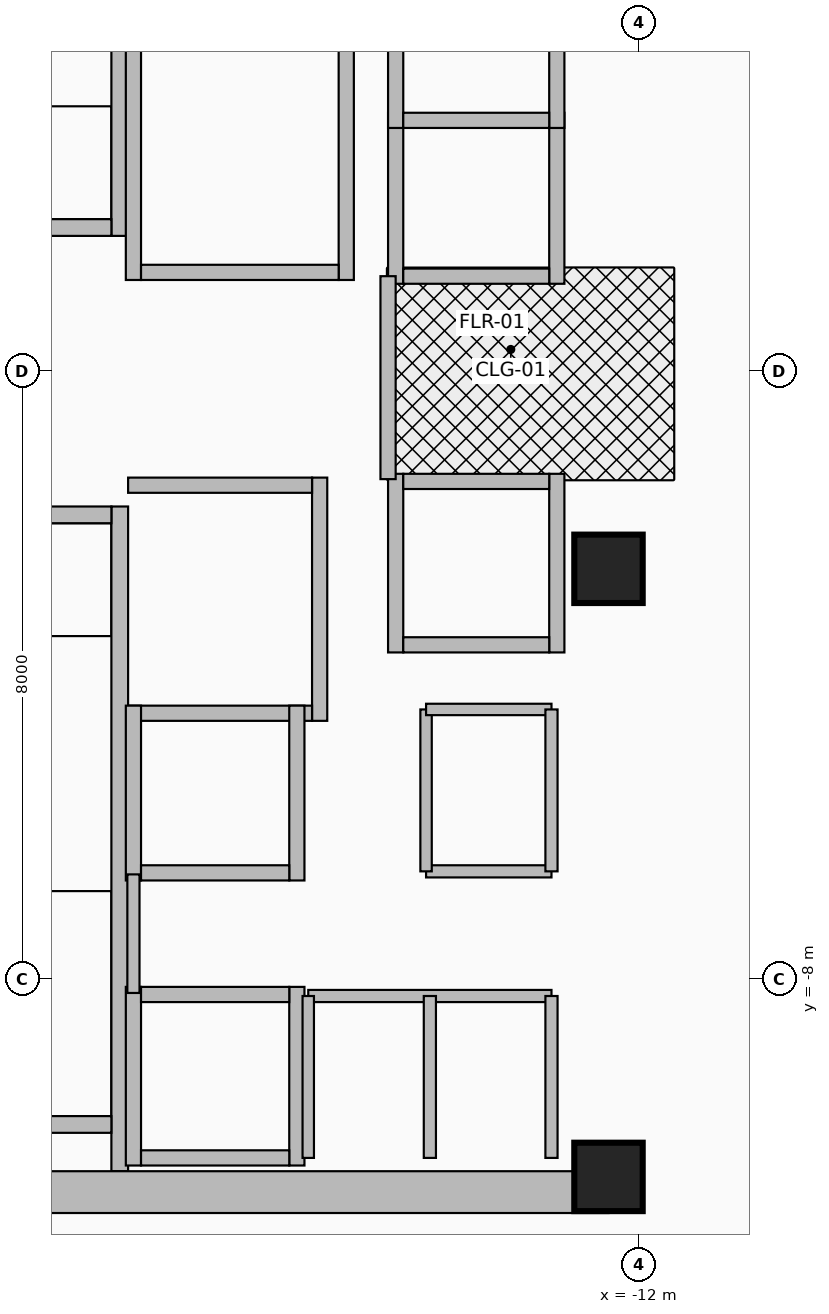
"""IFC4 building model, lengths in metres.
Left out: names, types, materials, properties, quantities, classifications, styles, units other than length and angle.
Written with IfcOpenShell. Run it as: python <this file> out.ifc"""

import sys

from ifc_helpers import new_model, si_unit, direction, frame, frame_2d, origin, origin_2d, place, context, subcontext, project, spatial, rectangle, extrude, source, transform, mapped, element, fill, save


model = new_model("IFC4")
c1 = context("Model", 3, precision=1e-05, world=origin(), true_north=direction((0.0, 1.0)))
c2 = subcontext(c1, "Body", "Model", "MODEL_VIEW")
j1 = project(units=[si_unit("LENGTHUNIT", "METRE"), si_unit("PLANEANGLEUNIT", "RADIAN")], contexts=[c1])
p1 = place(None, origin())
s1 = spatial("IfcSite", under=j1, at=p1, CompositionType="ELEMENT")
p2 = place(p1, origin())
s2 = spatial("IfcBuilding", under=s1, at=p2, CompositionType="ELEMENT")
p3 = place(p2, frame((0.0, 0.0, 201.0)))
s3 = spatial("IfcBuildingStorey", under=s2, at=p3, CompositionType="ELEMENT", Elevation=201.0)
p4 = place(p3, frame((-18.83, 1.78, 0.0), z_axis=(0.0, 0.0, 1.0), x_axis=(0.0, 1.0, 0.0)))
e1 = element("IfcWall", 1, at=p4, inside=s3, PredefinedType="SHEAR", context=c2, shape_type="SweptSolid", body=[
    extrude(rectangle(XDim=8.745, YDim=0.22, at=frame_2d((4.373, 0.0))), origin(), (0.0, 0.0, 1.0), 4.26),
])
p5 = place(p3, frame((-22.05, 1.89, 0.0), z_axis=(0.0, 0.0, 1.0), x_axis=(1.0, 0.0, 0.0)))
e2 = element("IfcWall", 2, at=p5, inside=s3, PredefinedType="SHEAR", context=c2, shape_type="SweptSolid", body=[
    extrude(rectangle(XDim=3.11, YDim=0.22, at=frame_2d((1.555, 0.0))), origin(), (0.0, 0.0, 1.0), 4.26),
])
p6 = place(p5, frame((1.0, 0.0, 0.0)))
e3 = element("IfcOpeningElement", 3, at=p6, cuts=e2, PredefinedType="OPENING", context=c2, shape_type="SweptSolid", body=[
    extrude(rectangle(XDim=1.1, YDim=2.15, at=frame_2d((0.55, 1.075))), frame((0.0, 0.125, 0.0), z_axis=(0.0, -1.0, 0.0), x_axis=(1.0, 0.0, 0.0)), (0.0, 0.0, 1.0), 0.25),
])
p7 = place(p3, frame((-18.83, -10.525, 0.0), z_axis=(0.0, 0.0, 1.0), x_axis=(0.0, 1.0, 0.0)))
e4 = element("IfcWall", 4, at=p7, inside=s3, PredefinedType="SHEAR", context=c2, shape_type="SweptSolid", body=[
    extrude(rectangle(XDim=8.745, YDim=0.22, at=frame_2d((4.373, 0.0))), origin(), (0.0, 0.0, 1.0), 4.26),
])
p8 = place(p3, frame((-22.05, -9.91, 0.0), z_axis=(0.0, 0.0, 1.0), x_axis=(1.0, 0.0, 0.0)))
e5 = element("IfcWall", 5, at=p8, inside=s3, PredefinedType="SHEAR", context=c2, shape_type="SweptSolid", body=[
    extrude(rectangle(XDim=3.11, YDim=0.22, at=frame_2d((1.555, 0.0))), origin(), (0.0, 0.0, 1.0), 4.26),
])
p9 = place(p3, frame((-22.05, -1.89, 0.0), z_axis=(0.0, 0.0, 1.0), x_axis=(1.0, 0.0, 0.0)))
e6 = element("IfcWall", 6, at=p9, inside=s3, PredefinedType="SHEAR", context=c2, shape_type="SweptSolid", body=[
    extrude(rectangle(XDim=3.11, YDim=0.22, at=frame_2d((1.555, 0.0))), origin(), (0.0, 0.0, 1.0), 4.26),
])
p10 = place(p9, frame((1.0, 0.0, 0.0)))
e7 = element("IfcOpeningElement", 7, at=p10, cuts=e6, PredefinedType="OPENING", context=c2, shape_type="SweptSolid", body=[
    extrude(rectangle(XDim=1.1, YDim=2.15, at=frame_2d((0.55, 1.075))), frame((0.0, 0.125, 0.0), z_axis=(0.0, -1.0, 0.0), x_axis=(1.0, 0.0, 0.0)), (0.0, 0.0, 1.0), 0.25),
])
p11 = place(p3, frame((-22.65, -10.8, 0.0), z_axis=(0.0, 0.0, 1.0), x_axis=(1.0, 0.0, 0.0)))
e8 = element("IfcWall", 8, at=p11, inside=s3, PredefinedType="SHEAR", context=c2, shape_type="SweptSolid", body=[
    extrude(rectangle(XDim=10.25, YDim=0.55, at=frame_2d((5.125, 0.0))), origin(), (0.0, 0.0, 1.0), 4.26),
])
m1 = source(origin(), c2, "Body", "SweptSolid", [
    extrude(rectangle(XDim=0.9, YDim=0.9, at=origin_2d()), origin(), (0.0, 0.0, 1.0), 4.5),
])
for number, where, z_axis, x_axis in (
    (9, (-12.4, -10.6, 0.0), (0.0, 0.0, 1.0), (1.0, 0.0, 0.0)),
    (10, (-12.4, -2.6, 0.0), (0.0, 0.0, 1.0), (1.0, 0.0, 0.0)),
):
    element("IfcColumn", number, at=place(p3, frame(where, z_axis=z_axis, x_axis=x_axis)), inside=s3, PredefinedType="COLUMN", context=c2, shape_type="MappedRepresentation", body=[
        mapped(m1, transform((0.0, 0.0, 0.0), x_axis=(1.0, 0.0, 0.0), y_axis=(0.0, 1.0, 0.0), z_axis=(0.0, 0.0, 1.0), scale=1.0)),
    ])
for number, where, z_axis, x_axis in (
    (11, (-18.65, 1.2, 0.0), (0.0, 0.0, 1.0), (0.0, 1.0, 0.0)),
    (12, (-15.85, 1.2, 0.0), (0.0, 0.0, 1.0), (0.0, 1.0, 0.0)),
):
    element("IfcWall", number, at=place(p3, frame(where, z_axis=z_axis, x_axis=x_axis)), inside=s3, PredefinedType="MOVABLE", context=c2, shape_type="SweptSolid", body=[
        extrude(rectangle(XDim=3.225, YDim=0.2, at=frame_2d((1.613, 0.0))), origin(), (0.0, 0.0, 1.0), 4.26),
    ])
p12 = place(p3, frame((-18.55, 1.3, 0.0), z_axis=(0.0, 0.0, 1.0), x_axis=(1.0, 0.0, 0.0)))
e13 = element("IfcWall", 13, at=p12, inside=s3, PredefinedType="MOVABLE", context=c2, shape_type="SweptSolid", body=[
    extrude(rectangle(XDim=2.6, YDim=0.2, at=frame_2d((1.3, 0.0))), origin(), (0.0, 0.0, 1.0), 4.26),
])
p13 = place(p12, frame((0.7, 0.0, 0.0)))
e14 = element("IfcOpeningElement", 14, at=p13, cuts=e13, PredefinedType="OPENING", context=c2, shape_type="SweptSolid", body=[
    extrude(rectangle(XDim=1.2, YDim=2.1, at=frame_2d((0.6, 1.05))), frame((0.0, 0.115, 0.0), z_axis=(0.0, -1.0, 0.0), x_axis=(1.0, 0.0, 0.0)), (0.0, 0.0, 1.0), 0.23),
])
p14 = place(p3, frame((-16.2, -4.6, 0.0), z_axis=(0.0, 0.0, 1.0), x_axis=(0.0, 1.0, 0.0)))
e15 = element("IfcWall", 15, at=p14, inside=s3, PredefinedType="MOVABLE", context=c2, shape_type="SweptSolid", body=[
    extrude(rectangle(XDim=3.2, YDim=0.2, at=frame_2d((1.6, 0.0))), origin(), (0.0, 0.0, 1.0), 4.26),
])
p15 = place(p3, frame((-18.72, -4.5, 0.0), z_axis=(0.0, 0.0, 1.0), x_axis=(1.0, 0.0, 0.0)))
e16 = element("IfcWall", 16, at=p15, inside=s3, PredefinedType="MOVABLE", context=c2, shape_type="SweptSolid", body=[
    extrude(rectangle(XDim=2.42, YDim=0.2, at=frame_2d((1.21, 0.0))), origin(), (0.0, 0.0, 1.0), 4.26),
])
p16 = place(p3, frame((-18.72, -1.5, 0.0), z_axis=(0.0, 0.0, 1.0), x_axis=(1.0, 0.0, 0.0)))
e17 = element("IfcWall", 17, at=p16, inside=s3, PredefinedType="MOVABLE", context=c2, shape_type="SweptSolid", body=[
    extrude(rectangle(XDim=2.42, YDim=0.2, at=frame_2d((1.21, 0.0))), origin(), (0.0, 0.0, 1.0), 4.26),
])
p17 = place(p16, frame((0.61, 0.0, 0.0)))
e18 = element("IfcOpeningElement", 18, at=p17, cuts=e17, PredefinedType="OPENING", context=c2, shape_type="SweptSolid", body=[
    extrude(rectangle(XDim=1.2, YDim=2.1, at=frame_2d((0.6, 1.05))), frame((0.0, 0.115, 0.0), z_axis=(0.0, -1.0, 0.0), x_axis=(1.0, 0.0, 0.0)), (0.0, 0.0, 1.0), 0.23),
])
for number, where, z_axis, x_axis in (
    (19, (-18.65, -10.45, 0.0), (0.0, 0.0, 1.0), (0.0, 1.0, 0.0)),
    (20, (-16.5, -10.45, 0.0), (0.0, 0.0, 1.0), (0.0, 1.0, 0.0)),
):
    element("IfcWall", number, at=place(p3, frame(where, z_axis=z_axis, x_axis=x_axis)), inside=s3, PredefinedType="MOVABLE", context=c2, shape_type="SweptSolid", body=[
        extrude(rectangle(XDim=2.35, YDim=0.2, at=frame_2d((1.175, 0.0))), origin(), (0.0, 0.0, 1.0), 3.544),
    ])
p18 = place(p3, frame((-18.55, -10.35, 0.0), z_axis=(0.0, 0.0, 1.0), x_axis=(1.0, 0.0, 0.0)))
e21 = element("IfcWall", 21, at=p18, inside=s3, PredefinedType="MOVABLE", context=c2, shape_type="SweptSolid", body=[
    extrude(rectangle(XDim=1.95, YDim=0.2, at=frame_2d((0.975, 0.0))), origin(), (0.0, 0.0, 1.0), 3.544),
])
p19 = place(p3, frame((-18.55, -8.2, 0.0), z_axis=(0.0, 0.0, 1.0), x_axis=(1.0, 0.0, 0.0)))
e22 = element("IfcWall", 22, at=p19, inside=s3, PredefinedType="MOVABLE", context=c2, shape_type="SweptSolid", body=[
    extrude(rectangle(XDim=1.95, YDim=0.2, at=frame_2d((0.975, 0.0))), origin(), (0.0, 0.0, 1.0), 4.26),
])
p20 = place(p19, frame((0.425, 0.0, 0.0)))
e23 = element("IfcOpeningElement", 23, at=p20, cuts=e22, PredefinedType="OPENING", context=c2, shape_type="SweptSolid", body=[
    extrude(rectangle(XDim=1.1, YDim=2.1, at=frame_2d((0.55, 1.05))), frame((0.0, 0.115, 0.0), z_axis=(0.0, -1.0, 0.0), x_axis=(1.0, 0.0, 0.0)), (0.0, 0.0, 1.0), 0.23),
])
p21 = place(p3, frame((-15.2, 1.15, 0.0), z_axis=(0.0, 0.0, 1.0), x_axis=(0.0, 1.0, 0.0)))
e24 = element("IfcWall", 24, at=p21, inside=s3, PredefinedType="MOVABLE", context=c2, shape_type="SweptSolid", body=[
    extrude(rectangle(XDim=2.25, YDim=0.2, at=frame_2d((1.125, 0.0))), origin(), (0.0, 0.0, 1.0), 4.26),
])
p22 = place(p3, frame((-13.08, 1.15, 0.0), z_axis=(0.0, 0.0, 1.0), x_axis=(0.0, 1.0, 0.0)))
e25 = element("IfcWall", 25, at=p22, inside=s3, PredefinedType="MOVABLE", context=c2, shape_type="SweptSolid", body=[
    extrude(rectangle(XDim=2.25, YDim=0.2, at=frame_2d((1.125, 0.0))), origin(), (0.0, 0.0, 1.0), 4.26),
])
p23 = place(p22, frame((0.575, 0.0, 0.0)))
e26 = element("IfcOpeningElement", 26, at=p23, cuts=e25, PredefinedType="OPENING", context=c2, shape_type="SweptSolid", body=[
    extrude(rectangle(XDim=1.1, YDim=2.1, at=frame_2d((0.55, 1.05))), frame((0.0, 0.115, 0.0), z_axis=(0.0, -1.0, 0.0), x_axis=(1.0, 0.0, 0.0)), (0.0, 0.0, 1.0), 0.23),
])
p24 = place(p3, frame((-15.1, 1.25, 0.0), z_axis=(0.0, 0.0, 1.0), x_axis=(1.0, 0.0, 0.0)))
e27 = element("IfcWall", 27, at=p24, inside=s3, PredefinedType="MOVABLE", context=c2, shape_type="SweptSolid", body=[
    extrude(rectangle(XDim=1.92, YDim=0.2, at=frame_2d((0.96, 0.0))), origin(), (0.0, 0.0, 1.0), 4.26),
])
p25 = place(p3, frame((-15.2, 3.2, 0.0), z_axis=(0.0, 0.0, 1.0), x_axis=(0.0, 1.0, 0.0)))
e28 = element("IfcWall", 28, at=p25, inside=s3, PredefinedType="MOVABLE", context=c2, shape_type="SweptSolid", body=[
    extrude(rectangle(XDim=2.25, YDim=0.2, at=frame_2d((1.125, 0.0))), origin(), (0.0, 0.0, 1.0), 4.26),
])
p26 = place(p3, frame((-13.08, 3.2, 0.0), z_axis=(0.0, 0.0, 1.0), x_axis=(0.0, 1.0, 0.0)))
e29 = element("IfcWall", 29, at=p26, inside=s3, PredefinedType="MOVABLE", context=c2, shape_type="SweptSolid", body=[
    extrude(rectangle(XDim=2.25, YDim=0.2, at=frame_2d((1.125, 0.0))), origin(), (0.0, 0.0, 1.0), 4.26),
])
p27 = place(p26, frame((0.575, 0.0, 0.0)))
e30 = element("IfcOpeningElement", 30, at=p27, cuts=e29, PredefinedType="OPENING", context=c2, shape_type="SweptSolid", body=[
    extrude(rectangle(XDim=1.1, YDim=2.1, at=frame_2d((0.55, 1.05))), frame((0.0, 0.115, 0.0), z_axis=(0.0, -1.0, 0.0), x_axis=(1.0, 0.0, 0.0)), (0.0, 0.0, 1.0), 0.23),
])
p28 = place(p3, frame((-15.1, 3.3, 0.0), z_axis=(0.0, 0.0, 1.0), x_axis=(1.0, 0.0, 0.0)))
e31 = element("IfcWall", 31, at=p28, inside=s3, PredefinedType="MOVABLE", context=c2, shape_type="SweptSolid", body=[
    extrude(rectangle(XDim=1.92, YDim=0.2, at=frame_2d((0.96, 0.0))), origin(), (0.0, 0.0, 1.0), 4.26),
])
for number, where, z_axis, x_axis in (
    (32, (-18.65, -6.7, 0.0), (0.0, 0.0, 1.0), (0.0, 1.0, 0.0)),
    (33, (-16.5, -6.7, 0.0), (0.0, 0.0, 1.0), (0.0, 1.0, 0.0)),
):
    element("IfcWall", number, at=place(p3, frame(where, z_axis=z_axis, x_axis=x_axis)), inside=s3, PredefinedType="MOVABLE", context=c2, shape_type="SweptSolid", body=[
        extrude(rectangle(XDim=2.3, YDim=0.2, at=frame_2d((1.15, 0.0))), origin(), (0.0, 0.0, 1.0), 4.26),
    ])
p29 = place(p3, frame((-18.55, -6.6, 0.0), z_axis=(0.0, 0.0, 1.0), x_axis=(1.0, 0.0, 0.0)))
e34 = element("IfcWall", 34, at=p29, inside=s3, PredefinedType="MOVABLE", context=c2, shape_type="SweptSolid", body=[
    extrude(rectangle(XDim=1.95, YDim=0.2, at=frame_2d((0.975, 0.0))), origin(), (0.0, 0.0, 1.0), 4.26),
])
p30 = place(p29, frame((0.425, 0.0, 0.0)))
e35 = element("IfcOpeningElement", 35, at=p30, cuts=e34, PredefinedType="OPENING", context=c2, shape_type="SweptSolid", body=[
    extrude(rectangle(XDim=1.1, YDim=2.1, at=frame_2d((0.55, 1.05))), frame((0.0, 0.115, 0.0), z_axis=(0.0, -1.0, 0.0), x_axis=(1.0, 0.0, 0.0)), (0.0, 0.0, 1.0), 0.23),
])
for number, where, z_axis, x_axis in (
    (36, (-15.2, -3.7, 0.0), (0.0, 0.0, 1.0), (0.0, 1.0, 0.0)),
    (37, (-13.08, -3.7, 0.0), (0.0, 0.0, 1.0), (0.0, 1.0, 0.0)),
):
    element("IfcWall", number, at=place(p3, frame(where, z_axis=z_axis, x_axis=x_axis)), inside=s3, PredefinedType="MOVABLE", context=c2, shape_type="SweptSolid", body=[
        extrude(rectangle(XDim=2.35, YDim=0.2, at=frame_2d((1.175, 0.0))), origin(), (0.0, 0.0, 1.0), 4.26),
    ])
p31 = place(p3, frame((-15.1, -3.6, 0.0), z_axis=(0.0, 0.0, 1.0), x_axis=(1.0, 0.0, 0.0)))
e38 = element("IfcWall", 38, at=p31, inside=s3, PredefinedType="MOVABLE", context=c2, shape_type="SweptSolid", body=[
    extrude(rectangle(XDim=1.92, YDim=0.2, at=frame_2d((0.96, 0.0))), origin(), (0.0, 0.0, 1.0), 4.26),
])
p32 = place(p3, frame((-15.1, -1.45, 0.0), z_axis=(0.0, 0.0, 1.0), x_axis=(1.0, 0.0, 0.0)))
e39 = element("IfcWall", 39, at=p32, inside=s3, PredefinedType="MOVABLE", context=c2, shape_type="SweptSolid", body=[
    extrude(rectangle(XDim=1.92, YDim=0.2, at=frame_2d((0.96, 0.0))), origin(), (0.0, 0.0, 1.0), 4.26),
])
p33 = place(p32, frame((0.41, 0.0, 0.0)))
e40 = element("IfcOpeningElement", 40, at=p33, cuts=e39, PredefinedType="OPENING", context=c2, shape_type="SweptSolid", body=[
    extrude(rectangle(XDim=1.1, YDim=2.1, at=frame_2d((0.55, 1.05))), frame((0.0, 0.115, 0.0), z_axis=(0.0, -1.0, 0.0), x_axis=(1.0, 0.0, 0.0)), (0.0, 0.0, 1.0), 0.23),
])
p34 = place(p3, frame((-15.3, -1.42, 0.0), z_axis=(0.0, 0.0, 1.0), x_axis=(0.0, 1.0, 0.0)))
e41 = element("IfcWall", 41, at=p34, inside=s3, PredefinedType="PARTITIONING", context=c2, shape_type="SweptSolid", body=[
    extrude(rectangle(XDim=2.67, YDim=0.2, at=frame_2d((1.335, 0.0))), origin(), (0.0, 0.0, 1.0), 4.26),
])
p35 = place(p34, frame((0.78, 0.0, 0.0)))
e42 = element("IfcOpeningElement", 42, at=p35, cuts=e41, PredefinedType="OPENING", context=c2, shape_type="SweptSolid", body=[
    extrude(rectangle(XDim=1.05, YDim=2.15, at=frame_2d((0.525, 1.075))), frame((0.0, 0.115, 0.0), z_axis=(0.0, -1.0, 0.0), x_axis=(1.0, 0.0, 0.0)), (0.0, 0.0, 1.0), 0.23),
])
p36 = place(p3, frame((-18.65, -8.18, 0.0), z_axis=(0.0, 0.0, 1.0), x_axis=(0.0, 1.0, 0.0)))
e43 = element("IfcWall", 43, at=p36, inside=s3, PredefinedType="PARTITIONING", context=c2, shape_type="SweptSolid", body=[
    extrude(rectangle(XDim=1.56, YDim=0.16, at=frame_2d((0.78, 0.0))), origin(), (0.0, 0.0, 1.0), 4.26),
])
p37 = place(p3, frame((-16.35, -8.22, 0.0), z_axis=(0.0, 0.0, 1.0), x_axis=(1.0, 0.0, 0.0)))
e44 = element("IfcWall", 44, at=p37, inside=s3, PredefinedType="PARTITIONING", context=c2, shape_type="SweptSolid", body=[
    extrude(rectangle(XDim=3.2, YDim=0.16, at=frame_2d((1.6, 0.0))), origin(), (0.0, 0.0, 1.0), 4.26),
])
p38 = place(p37, frame((0.35, 0.0, 0.0)))
e45 = element("IfcOpeningElement", 45, at=p38, cuts=e44, PredefinedType="OPENING", context=c2, shape_type="SweptSolid", body=[
    extrude(rectangle(XDim=0.85, YDim=2.05, at=frame_2d((0.425, 1.025))), frame((0.0, 0.095, 0.0), z_axis=(0.0, -1.0, 0.0), x_axis=(1.0, 0.0, 0.0)), (0.0, 0.0, 1.0), 0.19),
])
p39 = place(p37, frame((1.95, 0.0, 0.0)))
e46 = element("IfcOpeningElement", 46, at=p39, cuts=e44, PredefinedType="OPENING", context=c2, shape_type="SweptSolid", body=[
    extrude(rectangle(XDim=0.85, YDim=2.05, at=frame_2d((0.425, 1.025))), frame((0.0, 0.095, 0.0), z_axis=(0.0, -1.0, 0.0), x_axis=(1.0, 0.0, 0.0)), (0.0, 0.0, 1.0), 0.19),
])
p40 = place(p3, frame((-16.35, -10.35, 0.0), z_axis=(0.0, 0.0, 1.0), x_axis=(0.0, 1.0, 0.0)))
e47 = element("IfcWall", 47, at=p40, inside=s3, PredefinedType="PARTITIONING", context=c2, shape_type="SweptSolid", body=[
    extrude(rectangle(XDim=2.13, YDim=0.15, at=frame_2d((1.065, 0.0))), origin(), (0.0, 0.0, 1.0), 4.26),
])
for number, where, z_axis, x_axis in (
    (48, (-13.15, -10.35, 0.0), (0.0, 0.0, 1.0), (0.0, 1.0, 0.0)),
    (49, (-14.75, -10.35, 0.0), (0.0, 0.0, 1.0), (0.0, 1.0, 0.0)),
):
    element("IfcWall", number, at=place(p3, frame(where, z_axis=z_axis, x_axis=x_axis)), inside=s3, PredefinedType="PARTITIONING", context=c2, shape_type="SweptSolid", body=[
        extrude(rectangle(XDim=2.13, YDim=0.16, at=frame_2d((1.065, 0.0))), origin(), (0.0, 0.0, 1.0), 4.26),
    ])
p41 = place(p3, frame((-14.8, -6.58, 0.0), z_axis=(0.0, 0.0, 1.0), x_axis=(1.0, 0.0, 0.0)))
e50 = element("IfcWall", 50, at=p41, inside=s3, PredefinedType="PARTITIONING", context=c2, shape_type="SweptSolid", body=[
    extrude(rectangle(XDim=1.65, YDim=0.16, at=frame_2d((0.825, 0.0))), origin(), (0.0, 0.0, 1.0), 4.26),
])
p42 = place(p41, frame((0.5, 0.0, 0.0)))
e51 = element("IfcOpeningElement", 51, at=p42, cuts=e50, PredefinedType="OPENING", context=c2, shape_type="SweptSolid", body=[
    extrude(rectangle(XDim=0.85, YDim=2.05, at=frame_2d((0.425, 1.025))), frame((0.0, 0.095, 0.0), z_axis=(0.0, -1.0, 0.0), x_axis=(1.0, 0.0, 0.0)), (0.0, 0.0, 1.0), 0.19),
])
p43 = place(p3, frame((-14.8, -6.58, 0.0), z_axis=(0.0, 0.0, 1.0), x_axis=(0.0, 1.0, 0.0)))
e52 = element("IfcWall", 52, at=p43, inside=s3, PredefinedType="PARTITIONING", context=c2, shape_type="SweptSolid", body=[
    extrude(rectangle(XDim=2.13, YDim=0.15, at=frame_2d((1.065, 0.0))), origin(), (0.0, 0.0, 1.0), 4.26),
])
p44 = place(p3, frame((-14.8, -4.45, 0.0), z_axis=(0.0, 0.0, 1.0), x_axis=(1.0, 0.0, 0.0)))
e53 = element("IfcWall", 53, at=p44, inside=s3, PredefinedType="PARTITIONING", context=c2, shape_type="SweptSolid", body=[
    extrude(rectangle(XDim=1.65, YDim=0.15, at=frame_2d((0.825, 0.0))), origin(), (0.0, 0.0, 1.0), 4.26),
])
p45 = place(p3, frame((-13.15, -6.58, 0.0), z_axis=(0.0, 0.0, 1.0), x_axis=(0.0, 1.0, 0.0)))
e54 = element("IfcWall", 54, at=p45, inside=s3, PredefinedType="PARTITIONING", context=c2, shape_type="SweptSolid", body=[
    extrude(rectangle(XDim=2.13, YDim=0.16, at=frame_2d((1.065, 0.0))), origin(), (0.0, 0.0, 1.0), 4.26),
])
p46 = place(p13, origin())
e55 = element("IfcDoor", 55, at=p46, inside=s3, OperationType="DOUBLE_DOOR_SLIDING", PredefinedType="DOOR", context=c2, shape_type="SweptSolid", body=[
    extrude(rectangle(XDim=1.2, YDim=2.1, at=frame_2d((0.6, 1.05))), frame((0.0, 0.025, 0.0), z_axis=(0.0, -1.0, 0.0), x_axis=(1.0, 0.0, 0.0)), (0.0, 0.0, 1.0), 0.05),
])
fill(e14, e55)
p47 = place(p17, origin())
e56 = element("IfcDoor", 56, at=p47, inside=s3, OperationType="DOUBLE_DOOR_SLIDING", PredefinedType="DOOR", context=c2, shape_type="SweptSolid", body=[
    extrude(rectangle(XDim=1.2, YDim=2.1, at=frame_2d((0.6, 1.05))), frame((0.0, 0.025, 0.0), z_axis=(0.0, -1.0, 0.0), x_axis=(1.0, 0.0, 0.0)), (0.0, 0.0, 1.0), 0.05),
])
fill(e18, e56)
p48 = place(p20, origin())
e57 = element("IfcDoor", 57, at=p48, inside=s3, OperationType="DOUBLE_DOOR_SLIDING", PredefinedType="DOOR", context=c2, shape_type="SweptSolid", body=[
    extrude(rectangle(XDim=1.1, YDim=2.1, at=frame_2d((0.55, 1.05))), frame((0.0, 0.025, 0.0), z_axis=(0.0, -1.0, 0.0), x_axis=(1.0, 0.0, 0.0)), (0.0, 0.0, 1.0), 0.05),
])
fill(e23, e57)
p49 = place(p23, origin())
e58 = element("IfcDoor", 58, at=p49, inside=s3, OperationType="DOUBLE_DOOR_SLIDING", PredefinedType="DOOR", context=c2, shape_type="SweptSolid", body=[
    extrude(rectangle(XDim=1.1, YDim=2.1, at=frame_2d((0.55, 1.05))), frame((0.0, 0.025, 0.0), z_axis=(0.0, -1.0, 0.0), x_axis=(1.0, 0.0, 0.0)), (0.0, 0.0, 1.0), 0.05),
])
fill(e26, e58)
p50 = place(p27, origin())
e59 = element("IfcDoor", 59, at=p50, inside=s3, OperationType="DOUBLE_DOOR_SLIDING", PredefinedType="DOOR", context=c2, shape_type="SweptSolid", body=[
    extrude(rectangle(XDim=1.1, YDim=2.1, at=frame_2d((0.55, 1.05))), frame((0.0, 0.025, 0.0), z_axis=(0.0, -1.0, 0.0), x_axis=(1.0, 0.0, 0.0)), (0.0, 0.0, 1.0), 0.05),
])
fill(e30, e59)
p51 = place(p30, origin())
e60 = element("IfcDoor", 60, at=p51, inside=s3, OperationType="DOUBLE_DOOR_SLIDING", PredefinedType="DOOR", context=c2, shape_type="SweptSolid", body=[
    extrude(rectangle(XDim=1.1, YDim=2.1, at=frame_2d((0.55, 1.05))), frame((0.0, 0.025, 0.0), z_axis=(0.0, -1.0, 0.0), x_axis=(1.0, 0.0, 0.0)), (0.0, 0.0, 1.0), 0.05),
])
fill(e35, e60)
p52 = place(p33, origin())
e61 = element("IfcDoor", 61, at=p52, inside=s3, OperationType="DOUBLE_DOOR_SLIDING", PredefinedType="DOOR", context=c2, shape_type="SweptSolid", body=[
    extrude(rectangle(XDim=1.1, YDim=2.1, at=frame_2d((0.55, 1.05))), frame((0.0, 0.025, 0.0), z_axis=(0.0, -1.0, 0.0), x_axis=(1.0, 0.0, 0.0)), (0.0, 0.0, 1.0), 0.05),
])
fill(e40, e61)
p53 = place(p35, origin())
e62 = element("IfcDoor", 62, at=p53, inside=s3, OperationType="SINGLE_SWING_RIGHT", PredefinedType="DOOR", context=c2, shape_type="SweptSolid", body=[
    extrude(rectangle(XDim=1.05, YDim=2.15, at=frame_2d((0.525, 1.075))), frame((0.0, 0.025, 0.0), z_axis=(0.0, -1.0, 0.0), x_axis=(1.0, 0.0, 0.0)), (0.0, 0.0, 1.0), 0.05),
])
fill(e42, e62)
p54 = place(p38, origin())
e63 = element("IfcDoor", 63, at=p54, inside=s3, OperationType="SINGLE_SWING_LEFT", PredefinedType="DOOR", context=c2, shape_type="SweptSolid", body=[
    extrude(rectangle(XDim=0.85, YDim=2.05, at=frame_2d((0.425, 1.025))), frame((0.0, 0.025, 0.0), z_axis=(0.0, -1.0, 0.0), x_axis=(1.0, 0.0, 0.0)), (0.0, 0.0, 1.0), 0.05),
])
fill(e45, e63)
p55 = place(p39, origin())
e64 = element("IfcDoor", 64, at=p55, inside=s3, OperationType="SINGLE_SWING_RIGHT", PredefinedType="DOOR", context=c2, shape_type="SweptSolid", body=[
    extrude(rectangle(XDim=0.85, YDim=2.05, at=frame_2d((0.425, 1.025))), frame((0.0, 0.025, 0.0), z_axis=(0.0, -1.0, 0.0), x_axis=(1.0, 0.0, 0.0)), (0.0, 0.0, 1.0), 0.05),
])
fill(e46, e64)
p56 = place(p42, origin())
e65 = element("IfcDoor", 65, at=p56, inside=s3, OperationType="SINGLE_SWING_LEFT", PredefinedType="DOOR", context=c2, shape_type="SweptSolid", body=[
    extrude(rectangle(XDim=0.85, YDim=2.05, at=frame_2d((0.425, 1.025))), frame((0.0, 0.025, 0.0), z_axis=(0.0, -1.0, 0.0), x_axis=(1.0, 0.0, 0.0)), (0.0, 0.0, 1.0), 0.05),
])
fill(e51, e65)
save(model, sys.argv[1])
